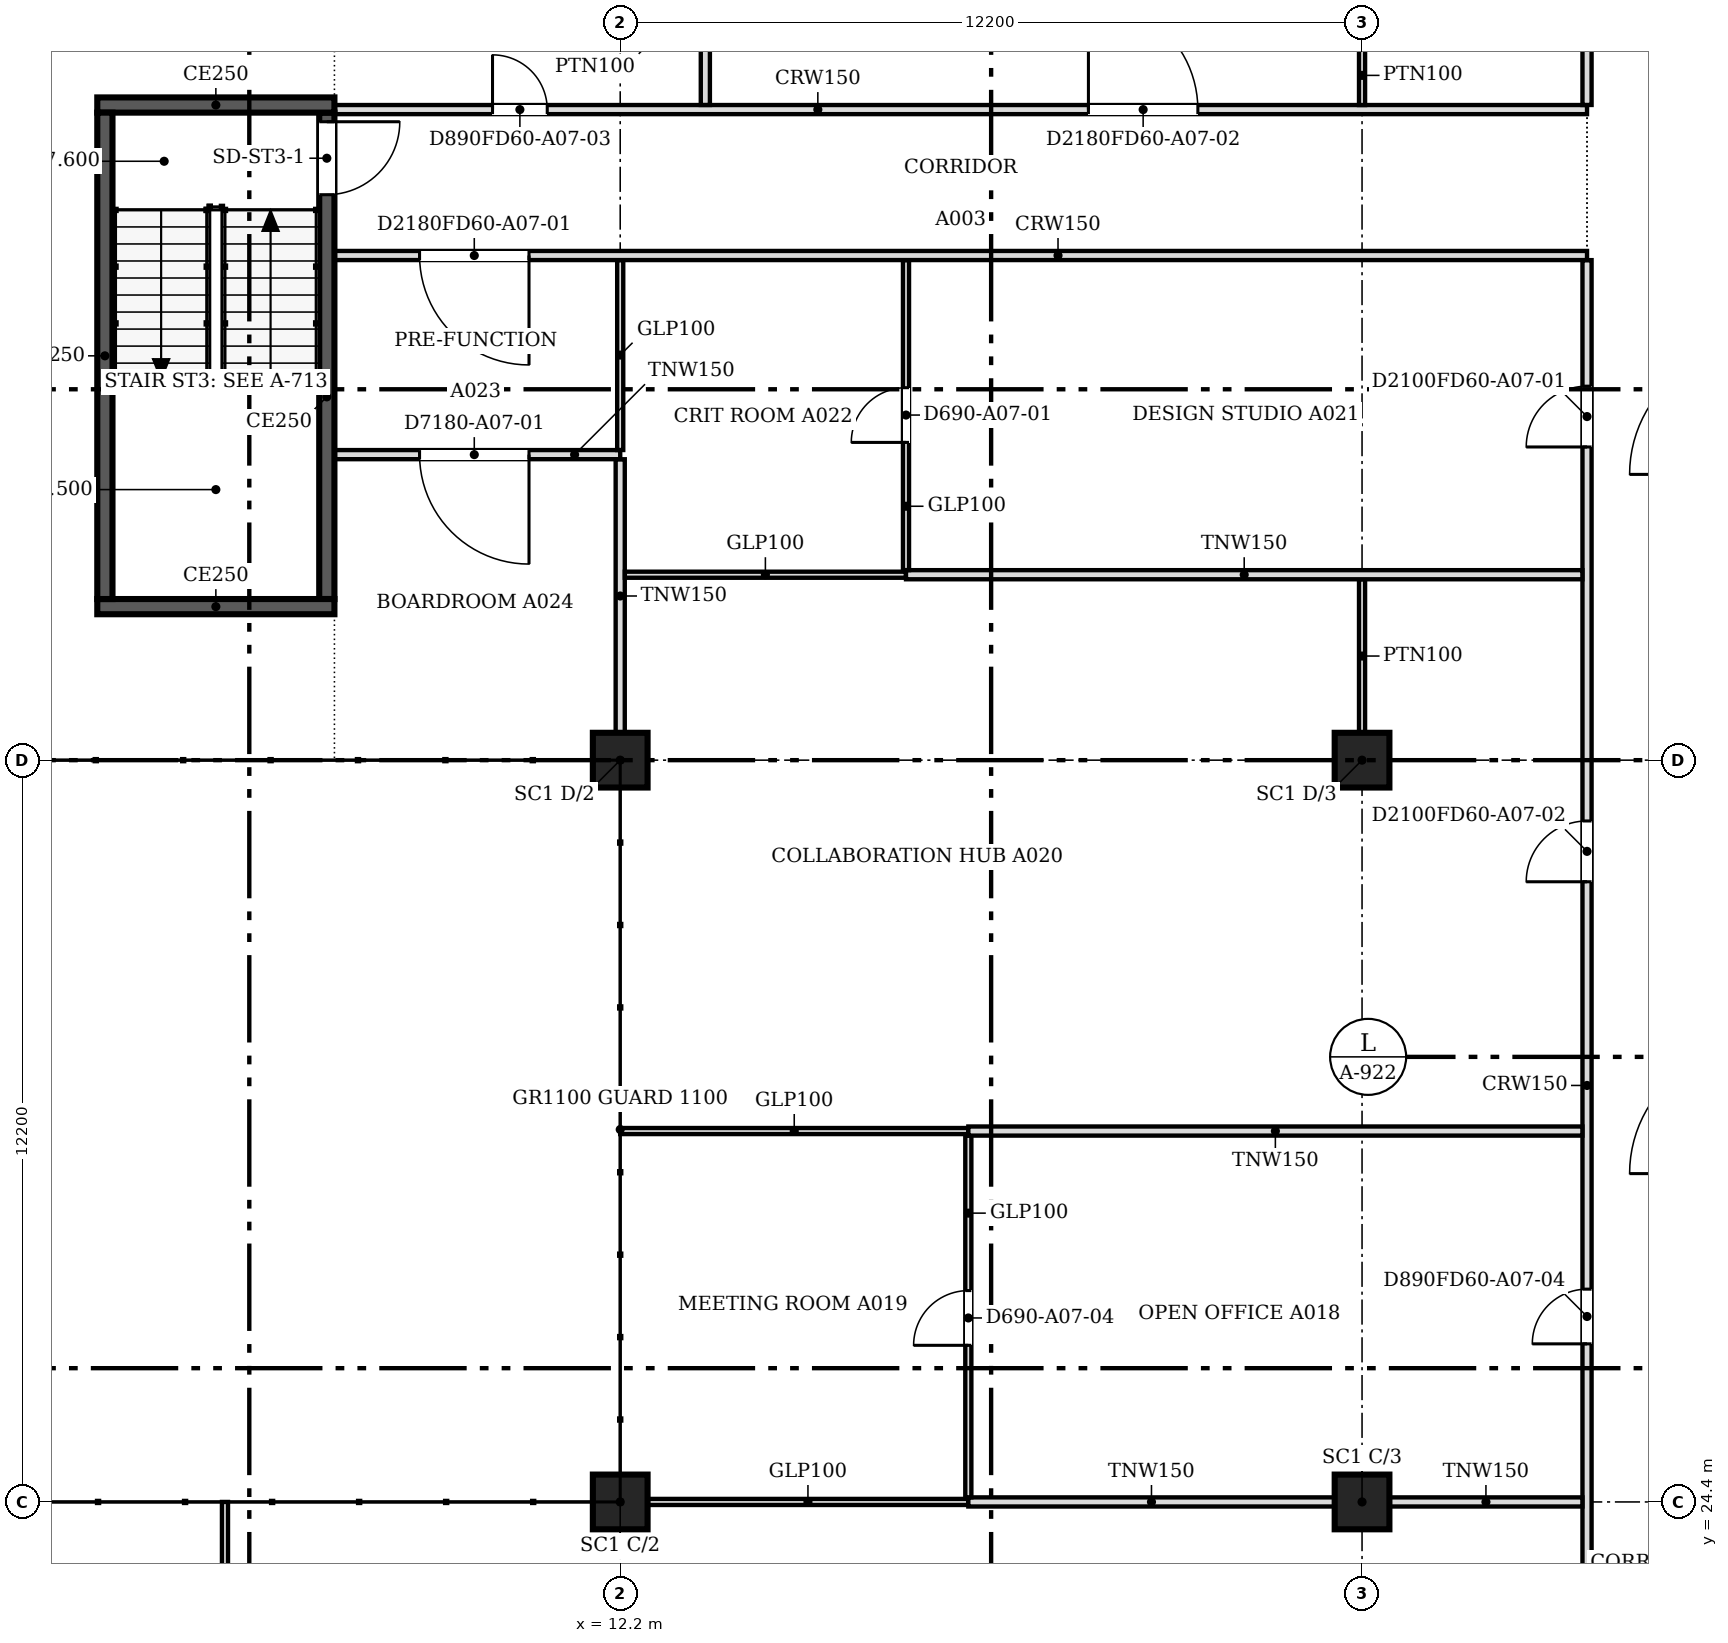
"""IFC4 building model, lengths in metres.
Left out: names, types, materials, properties, quantities, classifications, styles, units other than length and angle.
Written with IfcOpenShell. Run it as: python <this file> out.ifc"""

import sys

from ifc_helpers import new_model, si_unit, direction, frame, frame_2d, origin, origin_2d, place, context, subcontext, project, spatial, rectangle, extrude, source, transform, mapped, element, fill, save


model = new_model("IFC4")
c1 = context("Model", 3, precision=1e-05, world=origin(), true_north=direction((0.0, 1.0)))
c2 = subcontext(c1, "Body", "Model", "MODEL_VIEW")
j1 = project(units=[si_unit("LENGTHUNIT", "METRE"), si_unit("PLANEANGLEUNIT", "RADIAN")], contexts=[c1])
p1 = place(None, origin())
s1 = spatial("IfcSite", under=j1, at=p1, CompositionType="ELEMENT")
p2 = place(p1, origin())
s2 = spatial("IfcBuilding", under=s1, at=p2, CompositionType="ELEMENT")
p3 = place(p2, frame((0.0, 0.0, 80.0)))
s3 = spatial("IfcBuildingStorey", under=s2, at=p3, CompositionType="ELEMENT", Elevation=80.0)
for number, where, z_axis, x_axis in (
    (1, (12.2, 24.4, 0.0), (0.0, 0.0, 1.0), (1.0, 0.0, 0.0)),
    (2, (12.2, 36.6, 0.0), (0.0, 0.0, 1.0), (1.0, 0.0, 0.0)),
    (3, (24.4, 24.4, 0.0), (0.0, 0.0, 1.0), (1.0, 0.0, 0.0)),
    (4, (24.4, 36.6, 0.0), (0.0, 0.0, 1.0), (1.0, 0.0, 0.0)),
):
    element("IfcColumn", number, at=place(p3, frame(where, z_axis=z_axis, x_axis=x_axis)), inside=s3, PredefinedType="COLUMN", context=c2, shape_type="SweptSolid", body=[
        extrude(rectangle(XDim=0.9, YDim=0.9, at=origin_2d()), origin(), (0.0, 0.0, 1.0), 3.6),
    ])
p4 = place(p3, frame((7.5, 39.125, 0.0), z_axis=(0.0, 0.0, 1.0), x_axis=(-1.0, 0.0, 0.0)))
e5 = element("IfcWall", 5, at=p4, inside=s3, PredefinedType="SOLIDWALL", context=c2, shape_type="SweptSolid", body=[
    extrude(rectangle(XDim=3.9, YDim=0.25, at=frame_2d((1.95, 0.0))), origin(), (0.0, 0.0, 1.0), 3.8),
])
p5 = place(p3, frame((3.725, 39.25, 0.0), z_axis=(0.0, 0.0, 1.0), x_axis=(0.0, 1.0, 0.0)))
e6 = element("IfcWall", 6, at=p5, inside=s3, PredefinedType="SOLIDWALL", context=c2, shape_type="SweptSolid", body=[
    extrude(rectangle(XDim=8.0, YDim=0.25, at=frame_2d((4.0, 0.0))), origin(), (0.0, 0.0, 1.0), 3.8),
])
p6 = place(p3, frame((3.6, 47.375, 0.0), z_axis=(0.0, 0.0, 1.0), x_axis=(1.0, 0.0, 0.0)))
e7 = element("IfcWall", 7, at=p6, inside=s3, PredefinedType="SOLIDWALL", context=c2, shape_type="SweptSolid", body=[
    extrude(rectangle(XDim=3.9, YDim=0.25, at=frame_2d((1.95, 0.0))), origin(), (0.0, 0.0, 1.0), 3.8),
])
p7 = place(p3, frame((7.375, 47.25, 0.0), z_axis=(0.0, 0.0, 1.0), x_axis=(0.0, -1.0, 0.0)))
e8 = element("IfcWall", 8, at=p7, inside=s3, PredefinedType="SOLIDWALL", context=c2, shape_type="SweptSolid", body=[
    extrude(rectangle(XDim=8.0, YDim=0.25, at=frame_2d((4.0, 0.0))), origin(), (0.0, 0.0, 1.0), 3.8),
])
m1 = source(origin(), c2, "Body", "SweptSolid", [
    extrude(rectangle(XDim=1.2, YDim=2.1, at=frame_2d((0.6, 1.05))), frame((0.0, 0.135, 0.0), z_axis=(0.0, -1.0, 0.0), x_axis=(1.0, 0.0, 0.0)), (0.0, 0.0, 1.0), 0.27),
])
p8 = place(p7, frame((0.15, 0.0, 0.0)))
e9 = element("IfcOpeningElement", 9, at=p8, cuts=e8, PredefinedType="OPENING", context=c2, shape_type="MappedRepresentation", body=[
    mapped(m1, transform((0.0, 0.0, 0.0), scale=1.0)),
])
p9 = place(p3, frame((28.1, 18.8, 0.0), z_axis=(0.0, 0.0, 1.0), x_axis=(0.0, 1.0, 0.0)))
e10 = element("IfcWall", 10, at=p9, inside=s3, PredefinedType="PARTITIONING", context=c2, shape_type="SweptSolid", body=[
    extrude(rectangle(XDim=26.024, YDim=0.15, at=frame_2d((13.012, 0.0))), origin(), (0.0, 0.0, 1.0), 3.067),
])
m2 = source(origin(), c2, "Body", "SweptSolid", [
    extrude(rectangle(XDim=0.9, YDim=2.1, at=frame_2d((0.45, 1.05))), frame((0.0, 0.085, 0.0), z_axis=(0.0, -1.0, 0.0), x_axis=(1.0, 0.0, 0.0)), (0.0, 0.0, 1.0), 0.17),
])
p10 = place(p9, frame((1.1, 0.0, 0.0)))
e11 = element("IfcOpeningElement", 11, at=p10, cuts=e10, PredefinedType="OPENING", context=c2, shape_type="MappedRepresentation", body=[
    mapped(m2, transform((0.0, 0.0, 0.0), scale=1.0)),
])
m3 = source(origin(), c2, "Body", "SweptSolid", [
    extrude(rectangle(XDim=1.0, YDim=2.1, at=frame_2d((0.5, 1.05))), frame((0.0, 0.085, 0.0), z_axis=(0.0, -1.0, 0.0), x_axis=(1.0, 0.0, 0.0)), (0.0, 0.0, 1.0), 0.17),
])
p11 = place(p9, frame((22.951, 0.0, 0.0)))
e12 = element("IfcOpeningElement", 12, at=p11, cuts=e10, PredefinedType="OPENING", context=c2, shape_type="MappedRepresentation", body=[
    mapped(m3, transform((0.0, 0.0, 0.0), scale=1.0)),
])
p12 = place(p9, frame((8.2, 0.0, 0.0)))
e13 = element("IfcOpeningElement", 13, at=p12, cuts=e10, PredefinedType="OPENING", context=c2, shape_type="MappedRepresentation", body=[
    mapped(m2, transform((0.0, 0.0, 0.0), scale=1.0)),
])
p13 = place(p9, frame((15.8, 0.0, 0.0)))
e14 = element("IfcOpeningElement", 14, at=p13, cuts=e10, PredefinedType="OPENING", context=c2, shape_type="MappedRepresentation", body=[
    mapped(m3, transform((0.0, 0.0, 0.0), scale=1.0)),
])
p14 = place(p3, frame((5.7, 18.99, 0.0), z_axis=(0.0, 0.0, 1.0), x_axis=(0.0, 1.0, 0.0)))
e15 = element("IfcWall", 15, at=p14, inside=s3, PredefinedType="PARTITIONING", context=c2, shape_type="SweptSolid", body=[
    extrude(rectangle(XDim=5.41, YDim=0.1, at=frame_2d((2.705, 0.0))), origin(), (0.0, 0.0, 1.0), 3.067),
])
m4 = source(origin(), c2, "Body", "SweptSolid", [
    extrude(rectangle(XDim=0.9, YDim=2.1, at=frame_2d((0.45, 1.05))), frame((0.0, 0.06, 0.0), z_axis=(0.0, -1.0, 0.0), x_axis=(1.0, 0.0, 0.0)), (0.0, 0.0, 1.0), 0.12),
])
p15 = place(p14, frame((2.3, 0.0, 0.0)))
e16 = element("IfcOpeningElement", 16, at=p15, cuts=e15, PredefinedType="OPENING", context=c2, shape_type="MappedRepresentation", body=[
    mapped(m4, transform((0.0, 0.0, 0.0), scale=1.0)),
])
p16 = place(p3, frame((12.651, 24.4, 0.0), z_axis=(0.0, 0.0, 1.0), x_axis=(1.0, 0.0, 0.0)))
e17 = element("IfcWall", 17, at=p16, inside=s3, PredefinedType="PARTITIONING", context=c2, shape_type="SweptSolid", body=[
    extrude(rectangle(XDim=5.273, YDim=0.1, at=frame_2d((2.637, 0.0))), origin(), (0.0, 0.0, 1.0), 3.067),
])
p17 = place(p3, frame((17.925, 24.4, 0.0), z_axis=(0.0, 0.0, 1.0), x_axis=(1.0, 0.0, 0.0)))
e18 = element("IfcWall", 18, at=p17, inside=s3, PredefinedType="PARTITIONING", context=c2, shape_type="SweptSolid", body=[
    extrude(rectangle(XDim=6.024, YDim=0.15, at=frame_2d((3.012, 0.0))), origin(), (0.0, 0.0, 1.0), 3.067),
])
p18 = place(p3, frame((24.851, 24.4, 0.0), z_axis=(0.0, 0.0, 1.0), x_axis=(1.0, 0.0, 0.0)))
e19 = element("IfcWall", 19, at=p18, inside=s3, PredefinedType="PARTITIONING", context=c2, shape_type="SweptSolid", body=[
    extrude(rectangle(XDim=3.173, YDim=0.15, at=frame_2d((1.586, 0.0))), origin(), (0.0, 0.0, 1.0), 3.067),
])
p19 = place(p3, frame((17.925, 24.476, 0.0), z_axis=(0.0, 0.0, 1.0), x_axis=(0.0, 1.0, 0.0)))
e20 = element("IfcWall", 20, at=p19, inside=s3, PredefinedType="PARTITIONING", context=c2, shape_type="SweptSolid", body=[
    extrude(rectangle(XDim=5.948, YDim=0.1, at=frame_2d((2.974, 0.0))), origin(), (0.0, 0.0, 1.0), 3.067),
])
p20 = place(p19, frame((2.5, 0.0, 0.0)))
e21 = element("IfcOpeningElement", 21, at=p20, cuts=e20, PredefinedType="OPENING", context=c2, shape_type="MappedRepresentation", body=[
    mapped(m4, transform((0.0, 0.0, 0.0), scale=1.0)),
])
p21 = place(p3, frame((12.2, 30.5, 0.0), z_axis=(0.0, 0.0, 1.0), x_axis=(1.0, 0.0, 0.0)))
e22 = element("IfcWall", 22, at=p21, inside=s3, PredefinedType="PARTITIONING", context=c2, shape_type="SweptSolid", body=[
    extrude(rectangle(XDim=5.724, YDim=0.1, at=frame_2d((2.862, 0.0))), origin(), (0.0, 0.0, 1.0), 3.067),
])
p22 = place(p3, frame((17.925, 30.5, 0.0), z_axis=(0.0, 0.0, 1.0), x_axis=(1.0, 0.0, 0.0)))
e23 = element("IfcWall", 23, at=p22, inside=s3, PredefinedType="PARTITIONING", context=c2, shape_type="SweptSolid", body=[
    extrude(rectangle(XDim=10.099, YDim=0.15, at=frame_2d((5.049, 0.0))), origin(), (0.0, 0.0, 1.0), 3.067),
])
p23 = place(p3, frame((12.2, 37.051, 0.0), z_axis=(0.0, 0.0, 1.0), x_axis=(0.0, 1.0, 0.0)))
e24 = element("IfcWall", 24, at=p23, inside=s3, PredefinedType="PARTITIONING", context=c2, shape_type="SweptSolid", body=[
    extrude(rectangle(XDim=4.498, YDim=0.15, at=frame_2d((2.249, 0.0))), origin(), (0.0, 0.0, 1.0), 3.067),
])
p24 = place(p3, frame((24.4, 37.05, 0.0), z_axis=(0.0, 0.0, 1.0), x_axis=(0.0, 1.0, 0.0)))
e25 = element("IfcWall", 25, at=p24, inside=s3, PredefinedType="PARTITIONING", context=c2, shape_type="SweptSolid", body=[
    extrude(rectangle(XDim=2.525, YDim=0.1, at=frame_2d((1.262, 0.0))), origin(), (0.0, 0.0, 1.0), 3.067),
])
p25 = place(p3, frame((12.276, 39.65, 0.0), z_axis=(0.0, 0.0, 1.0), x_axis=(1.0, 0.0, 0.0)))
e26 = element("IfcWall", 26, at=p25, inside=s3, PredefinedType="PARTITIONING", context=c2, shape_type="SweptSolid", body=[
    extrude(rectangle(XDim=4.623, YDim=0.1, at=frame_2d((2.312, 0.0))), origin(), (0.0, 0.0, 1.0), 3.067),
])
p26 = place(p3, frame((16.9, 39.65, 0.0), z_axis=(0.0, 0.0, 1.0), x_axis=(1.0, 0.0, 0.0)))
e27 = element("IfcWall", 27, at=p26, inside=s3, PredefinedType="PARTITIONING", context=c2, shape_type="SweptSolid", body=[
    extrude(rectangle(XDim=11.124, YDim=0.15, at=frame_2d((5.562, 0.0))), origin(), (0.0, 0.0, 1.0), 3.067),
])
p27 = place(p3, frame((16.9, 39.726, 0.0), z_axis=(0.0, 0.0, 1.0), x_axis=(0.0, 1.0, 0.0)))
e28 = element("IfcWall", 28, at=p27, inside=s3, PredefinedType="PARTITIONING", context=c2, shape_type="SweptSolid", body=[
    extrude(rectangle(XDim=5.098, YDim=0.1, at=frame_2d((2.549, 0.0))), origin(), (0.0, 0.0, 1.0), 3.067),
])
p28 = place(p27, frame((2.1, 0.0, 0.0)))
e29 = element("IfcOpeningElement", 29, at=p28, cuts=e28, PredefinedType="OPENING", context=c2, shape_type="MappedRepresentation", body=[
    mapped(m4, transform((0.0, 0.0, 0.0), scale=1.0)),
])
p29 = place(p3, frame((12.2, 41.625, 0.0), z_axis=(0.0, 0.0, 1.0), x_axis=(-1.0, 0.0, 0.0)))
e30 = element("IfcWall", 30, at=p29, inside=s3, PredefinedType="PARTITIONING", context=c2, shape_type="SweptSolid", body=[
    extrude(rectangle(XDim=4.7, YDim=0.15, at=frame_2d((2.35, 0.0))), origin(), (0.0, 0.0, 1.0), 3.067),
])
m5 = source(origin(), c2, "Body", "SweptSolid", [
    extrude(rectangle(XDim=1.8, YDim=2.1, at=frame_2d((0.9, 1.05))), frame((0.0, 0.085, 0.0), z_axis=(0.0, -1.0, 0.0), x_axis=(1.0, 0.0, 0.0)), (0.0, 0.0, 1.0), 0.17),
])
p30 = place(p29, frame((1.5, 0.0, 0.0)))
e31 = element("IfcOpeningElement", 31, at=p30, cuts=e30, PredefinedType="OPENING", context=c2, shape_type="MappedRepresentation", body=[
    mapped(m5, transform((0.0, 0.0, 0.0), scale=1.0)),
])
p31 = place(p3, frame((12.2, 41.701, 0.0), z_axis=(0.0, 0.0, 1.0), x_axis=(0.0, 1.0, 0.0)))
e32 = element("IfcWall", 32, at=p31, inside=s3, PredefinedType="PARTITIONING", context=c2, shape_type="SweptSolid", body=[
    extrude(rectangle(XDim=3.123, YDim=0.1, at=frame_2d((1.562, 0.0))), origin(), (0.0, 0.0, 1.0), 3.067),
])
p32 = place(p3, frame((28.1, 44.9, 0.0), z_axis=(0.0, 0.0, 1.0), x_axis=(-1.0, 0.0, 0.0)))
e33 = element("IfcWall", 33, at=p32, inside=s3, PredefinedType="PARTITIONING", context=c2, shape_type="SweptSolid", body=[
    extrude(rectangle(XDim=20.6, YDim=0.15, at=frame_2d((10.3, 0.0))), origin(), (0.0, 0.0, 1.0), 3.067),
])
p33 = place(p32, frame((17.4, 0.0, 0.0)))
e34 = element("IfcOpeningElement", 34, at=p33, cuts=e33, PredefinedType="OPENING", context=c2, shape_type="MappedRepresentation", body=[
    mapped(m5, transform((0.0, 0.0, 0.0), scale=1.0)),
])
p34 = place(p3, frame((7.5, 47.3, 0.0), z_axis=(0.0, 0.0, 1.0), x_axis=(1.0, 0.0, 0.0)))
e35 = element("IfcWall", 35, at=p34, inside=s3, PredefinedType="PARTITIONING", context=c2, shape_type="SweptSolid", body=[
    extrude(rectangle(XDim=20.6, YDim=0.15, at=frame_2d((10.3, 0.0))), origin(), (0.0, 0.0, 1.0), 3.067),
])
p35 = place(p34, frame((2.6, 0.0, 0.0)))
e36 = element("IfcOpeningElement", 36, at=p35, cuts=e35, PredefinedType="OPENING", context=c2, shape_type="MappedRepresentation", body=[
    mapped(m2, transform((0.0, 0.0, 0.0), scale=1.0)),
])
p36 = place(p34, frame((12.4, 0.0, 0.0)))
e37 = element("IfcOpeningElement", 37, at=p36, cuts=e35, PredefinedType="OPENING", context=c2, shape_type="MappedRepresentation", body=[
    mapped(m5, transform((0.0, 0.0, 0.0), scale=1.0)),
])
p37 = place(p3, frame((13.6, 47.376, 0.0), z_axis=(0.0, 0.0, 1.0), x_axis=(0.0, 1.0, 0.0)))
e38 = element("IfcWall", 38, at=p37, inside=s3, PredefinedType="PARTITIONING", context=c2, shape_type="SweptSolid", body=[
    extrude(rectangle(XDim=4.048, YDim=0.15, at=frame_2d((2.024, 0.0))), origin(), (0.0, 0.0, 1.0), 3.067),
])
p38 = place(p3, frame((28.1, 47.376, 0.0), z_axis=(0.0, 0.0, 1.0), x_axis=(0.0, 1.0, 0.0)))
e39 = element("IfcWall", 39, at=p38, inside=s3, PredefinedType="PARTITIONING", context=c2, shape_type="SweptSolid", body=[
    extrude(rectangle(XDim=3.748, YDim=0.15, at=frame_2d((1.874, 0.0))), origin(), (0.0, 0.0, 1.0), 3.067),
])
p39 = place(p3, frame((24.4, 48.35, 0.0), z_axis=(0.0, 0.0, 1.0), x_axis=(0.0, -1.0, 0.0)))
e40 = element("IfcWall", 40, at=p39, inside=s3, PredefinedType="PARTITIONING", context=c2, shape_type="SweptSolid", body=[
    extrude(rectangle(XDim=0.975, YDim=0.1, at=frame_2d((0.488, 0.0))), origin(), (0.0, 0.0, 1.0), 3.067),
])
m6 = source(origin(), c2, "Body", "SweptSolid", [
    extrude(rectangle(XDim=1.2, YDim=2.1, at=frame_2d((0.6, 1.05))), frame((0.0, 0.025, 0.0), z_axis=(0.0, -1.0, 0.0), x_axis=(1.0, 0.0, 0.0)), (0.0, 0.0, 1.0), 0.05),
])
p40 = place(p8, origin())
e41 = element("IfcDoor", 41, at=p40, inside=s3, OperationType="SINGLE_SWING_LEFT", PredefinedType="DOOR", context=c2, shape_type="MappedRepresentation", body=[
    mapped(m6, transform((0.0, 0.0, 0.0), scale=1.0)),
])
fill(e9, e41)
m7 = source(origin(), c2, "Body", "SweptSolid", [
    extrude(rectangle(XDim=1.8, YDim=2.1, at=frame_2d((0.9, 1.05))), frame((0.0, 0.025, 0.0), z_axis=(0.0, -1.0, 0.0), x_axis=(1.0, 0.0, 0.0)), (0.0, 0.0, 1.0), 0.05),
])
p41 = place(p33, origin())
e42 = element("IfcDoor", 42, at=p41, inside=s3, OperationType="DOUBLE_DOOR_SINGLE_SWING", PredefinedType="DOOR", context=c2, shape_type="MappedRepresentation", body=[
    mapped(m7, transform((0.0, 0.0, 0.0), scale=1.0)),
])
fill(e34, e42)
p42 = place(p30, origin())
e43 = element("IfcDoor", 43, at=p42, inside=s3, OperationType="DOUBLE_DOOR_SINGLE_SWING", PredefinedType="DOOR", context=c2, shape_type="MappedRepresentation", body=[
    mapped(m7, transform((0.0, 0.0, 0.0), scale=1.0)),
])
fill(e31, e43)
m8 = source(origin(), c2, "Body", "SweptSolid", [
    extrude(rectangle(XDim=0.9, YDim=2.1, at=frame_2d((0.45, 1.05))), frame((0.0, 0.025, 0.0), z_axis=(0.0, -1.0, 0.0), x_axis=(1.0, 0.0, 0.0)), (0.0, 0.0, 1.0), 0.05),
])
p43 = place(p28, origin())
e44 = element("IfcDoor", 44, at=p43, inside=s3, OperationType="SINGLE_SWING_LEFT", PredefinedType="DOOR", context=c2, shape_type="MappedRepresentation", body=[
    mapped(m8, transform((0.0, 0.0, 0.0), scale=1.0)),
])
fill(e29, e44)
m9 = source(origin(), c2, "Body", "SweptSolid", [
    extrude(rectangle(XDim=1.0, YDim=2.1, at=frame_2d((0.5, 1.05))), frame((0.0, 0.025, 0.0), z_axis=(0.0, -1.0, 0.0), x_axis=(1.0, 0.0, 0.0)), (0.0, 0.0, 1.0), 0.05),
])
p44 = place(p11, origin())
e45 = element("IfcDoor", 45, at=p44, inside=s3, OperationType="SINGLE_SWING_LEFT", PredefinedType="DOOR", context=c2, shape_type="MappedRepresentation", body=[
    mapped(m9, transform((0.0, 0.0, 0.0), scale=1.0)),
])
fill(e12, e45)
p45 = place(p20, origin())
e46 = element("IfcDoor", 46, at=p45, inside=s3, OperationType="SINGLE_SWING_LEFT", PredefinedType="DOOR", context=c2, shape_type="MappedRepresentation", body=[
    mapped(m8, transform((0.0, 0.0, 0.0), scale=1.0)),
])
fill(e21, e46)
p46 = place(p35, origin())
e47 = element("IfcDoor", 47, at=p46, inside=s3, OperationType="SINGLE_SWING_LEFT", PredefinedType="DOOR", context=c2, shape_type="MappedRepresentation", body=[
    mapped(m8, transform((0.0, 0.0, 0.0), scale=1.0)),
])
fill(e36, e47)
p47 = place(p12, origin())
e48 = element("IfcDoor", 48, at=p47, inside=s3, OperationType="SINGLE_SWING_LEFT", PredefinedType="DOOR", context=c2, shape_type="MappedRepresentation", body=[
    mapped(m8, transform((0.0, 0.0, 0.0), scale=1.0)),
])
fill(e13, e48)
p48 = place(p13, origin())
e49 = element("IfcDoor", 49, at=p48, inside=s3, OperationType="SINGLE_SWING_LEFT", PredefinedType="DOOR", context=c2, shape_type="MappedRepresentation", body=[
    mapped(m9, transform((0.0, 0.0, 0.0), scale=1.0)),
])
fill(e14, e49)
p49 = place(p36, origin())
e50 = element("IfcDoor", 50, at=p49, inside=s3, OperationType="DOUBLE_DOOR_SINGLE_SWING", PredefinedType="DOOR", context=c2, shape_type="MappedRepresentation", body=[
    mapped(m7, transform((0.0, 0.0, 0.0), scale=1.0)),
])
fill(e37, e50)
save(model, sys.argv[1])
